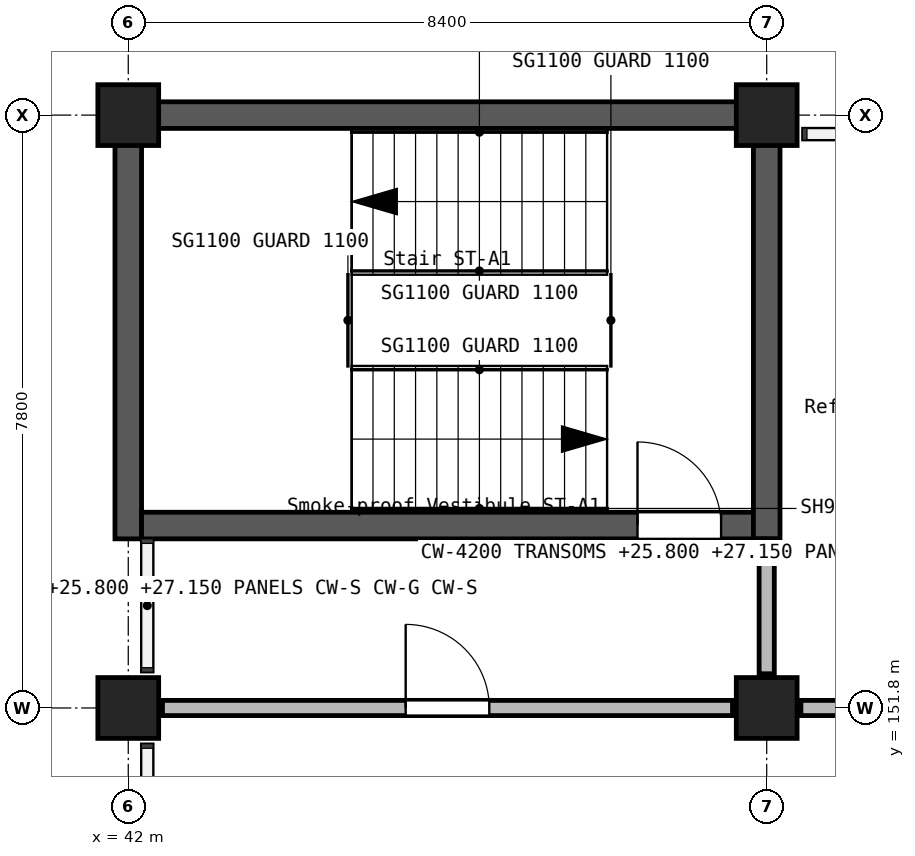
"""IFC4 building model, lengths in metres.
Left out: names, types, materials, properties, quantities, classifications, styles, units other than length and angle.
Written with IfcOpenShell. Run it as: python <this file> out.ifc"""

import sys

from ifc_helpers import new_model, si_unit, direction, frame, frame_2d, origin, origin_2d, place, context, subcontext, project, spatial, rectangle, extrude, element, fill, save


model = new_model("IFC4")
c1 = context("Model", 3, precision=1e-05, world=origin(), true_north=direction((0.0, 1.0)))
c2 = subcontext(c1, "Body", "Model", "MODEL_VIEW")
j1 = project(units=[si_unit("LENGTHUNIT", "METRE"), si_unit("PLANEANGLEUNIT", "RADIAN")], contexts=[c1])
p1 = place(None, origin())
s1 = spatial("IfcSite", under=j1, at=p1, CompositionType="ELEMENT")
p2 = place(p1, origin())
s2 = spatial("IfcBuilding", under=s1, at=p2, CompositionType="ELEMENT")
p3 = place(p2, frame((0.0, 0.0, 24.9)))
s3 = spatial("IfcBuildingStorey", under=s2, at=p3, CompositionType="ELEMENT", Elevation=24.9)
for number, where, z_axis, x_axis in (
    (1, (42.0, 151.8, 0.0), (0.0, 0.0, 1.0), (1.0, 0.0, 0.0)),
    (2, (42.0, 159.6, 0.0), (0.0, 0.0, 1.0), (1.0, 0.0, 0.0)),
    (3, (50.4, 151.8, 0.0), (0.0, 0.0, 1.0), (1.0, 0.0, 0.0)),
    (4, (50.4, 159.6, 0.0), (0.0, 0.0, 1.0), (1.0, 0.0, 0.0)),
):
    element("IfcColumn", number, at=place(p3, frame(where, z_axis=z_axis, x_axis=x_axis)), inside=s3, PredefinedType="COLUMN", context=c2, shape_type="SweptSolid", body=[
        extrude(rectangle(XDim=0.8, YDim=0.8, at=origin_2d()), origin(), (0.0, 0.0, 1.0), 3.9),
    ])
p4 = place(p3, frame((41.825, 159.6, 0.0), z_axis=(0.0, 0.0, 1.0), x_axis=(1.0, 0.0, 0.0)))
e5 = element("IfcWall", 5, at=p4, inside=s3, PredefinedType="SHEAR", context=c2, shape_type="SweptSolid", body=[
    extrude(rectangle(XDim=8.4, YDim=0.35, at=frame_2d((4.2, 0.0))), origin(), (0.0, 0.0, 1.0), 3.9),
])
p5 = place(p3, frame((42.0, 154.025, 0.0), z_axis=(0.0, 0.0, 1.0), x_axis=(0.0, 1.0, 0.0)))
e6 = element("IfcWall", 6, at=p5, inside=s3, PredefinedType="SHEAR", context=c2, shape_type="SweptSolid", body=[
    extrude(rectangle(XDim=5.4, YDim=0.35, at=frame_2d((2.7, 0.0))), origin(), (0.0, 0.0, 1.0), 3.9),
])
p6 = place(p3, frame((42.175, 154.2, 0.0), z_axis=(0.0, 0.0, 1.0), x_axis=(1.0, 0.0, 0.0)))
e7 = element("IfcWall", 7, at=p6, inside=s3, PredefinedType="SHEAR", context=c2, shape_type="SweptSolid", body=[
    extrude(rectangle(XDim=8.05, YDim=0.35, at=frame_2d((4.025, 0.0))), origin(), (0.0, 0.0, 1.0), 3.9),
])
p7 = place(p6, frame((6.525, 0.0, 0.0)))
e8 = element("IfcOpeningElement", 8, at=p7, cuts=e7, PredefinedType="OPENING", context=c2, shape_type="SweptSolid", body=[
    extrude(rectangle(XDim=1.1, YDim=2.1, at=frame_2d((0.55, 1.05))), frame((0.0, 0.185, 0.0), z_axis=(0.0, -1.0, 0.0), x_axis=(1.0, 0.0, 0.0)), (0.0, 0.0, 1.0), 0.37),
])
p8 = place(p3, frame((50.4, 154.025, 0.0), z_axis=(0.0, 0.0, 1.0), x_axis=(0.0, 1.0, 0.0)))
e9 = element("IfcWall", 9, at=p8, inside=s3, PredefinedType="SHEAR", context=c2, shape_type="SweptSolid", body=[
    extrude(rectangle(XDim=5.75, YDim=0.35, at=frame_2d((2.875, 0.0))), origin(), (0.0, 0.0, 1.0), 3.9),
])
p9 = place(p3, frame((42.45, 151.8, 0.0), z_axis=(0.0, 0.0, 1.0), x_axis=(1.0, 0.0, 0.0)))
e10 = element("IfcWall", 10, at=p9, inside=s3, PredefinedType="SOLIDWALL", context=c2, shape_type="SweptSolid", body=[
    extrude(rectangle(XDim=7.5, YDim=0.2, at=frame_2d((3.75, 0.0))), origin(), (0.0, 0.0, 1.0), 3.6),
])
p10 = place(p9, frame((3.2, 0.0, 0.0)))
e11 = element("IfcOpeningElement", 11, at=p10, cuts=e10, PredefinedType="OPENING", context=c2, shape_type="SweptSolid", body=[
    extrude(rectangle(XDim=1.1, YDim=2.1, at=frame_2d((0.55, 1.05))), frame((0.0, 0.11, 0.0), z_axis=(0.0, -1.0, 0.0), x_axis=(1.0, 0.0, 0.0)), (0.0, 0.0, 1.0), 0.22),
])
p11 = place(p3, frame((50.85, 151.8, 0.0), z_axis=(0.0, 0.0, 1.0), x_axis=(1.0, 0.0, 0.0)))
e12 = element("IfcWall", 12, at=p11, inside=s3, PredefinedType="SOLIDWALL", context=c2, shape_type="SweptSolid", body=[
    extrude(rectangle(XDim=3.85, YDim=0.2, at=frame_2d((1.925, 0.0))), origin(), (0.0, 0.0, 1.0), 3.6),
])
p12 = place(p11, frame((1.15, 0.0, 0.0)))
e13 = element("IfcOpeningElement", 13, at=p12, cuts=e12, PredefinedType="OPENING", context=c2, shape_type="SweptSolid", body=[
    extrude(rectangle(XDim=1.0, YDim=2.1, at=frame_2d((0.5, 1.05))), frame((0.0, 0.11, 0.0), z_axis=(0.0, -1.0, 0.0), x_axis=(1.0, 0.0, 0.0)), (0.0, 0.0, 1.0), 0.22),
])
p13 = place(p3, frame((50.4, 152.25, 0.0), z_axis=(0.0, 0.0, 1.0), x_axis=(0.0, 1.0, 0.0)))
e14 = element("IfcWall", 14, at=p13, inside=s3, PredefinedType="SOLIDWALL", context=c2, shape_type="SweptSolid", body=[
    extrude(rectangle(XDim=1.775, YDim=0.2, at=frame_2d((0.887, 0.0))), origin(), (0.0, 0.0, 1.0), 3.6),
])
p14 = place(p7, origin())
e15 = element("IfcDoor", 15, at=p14, inside=s3, OperationType="SINGLE_SWING_RIGHT", PredefinedType="DOOR", context=c2, shape_type="SweptSolid", body=[
    extrude(rectangle(XDim=1.1, YDim=2.1, at=frame_2d((0.55, 1.05))), frame((0.0, 0.025, 0.0), z_axis=(0.0, -1.0, 0.0), x_axis=(1.0, 0.0, 0.0)), (0.0, 0.0, 1.0), 0.05),
])
fill(e8, e15)
p15 = place(p10, origin())
e16 = element("IfcDoor", 16, at=p15, inside=s3, OperationType="SINGLE_SWING_RIGHT", PredefinedType="DOOR", context=c2, shape_type="SweptSolid", body=[
    extrude(rectangle(XDim=1.1, YDim=2.1, at=frame_2d((0.55, 1.05))), frame((0.0, 0.025, 0.0), z_axis=(0.0, -1.0, 0.0), x_axis=(1.0, 0.0, 0.0)), (0.0, 0.0, 1.0), 0.05),
])
fill(e11, e16)
save(model, sys.argv[1])
